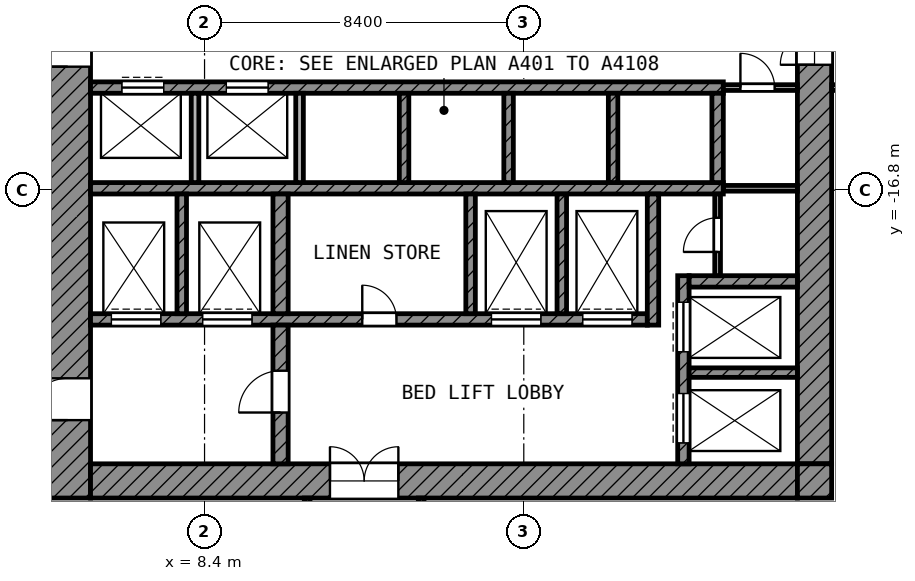
"""IFC4 building model, lengths in metres.
Left out: names, types, materials, properties, quantities, classifications, styles, units other than length and angle.
Written with IfcOpenShell. Run it as: python <this file> out.ifc"""

import sys

from ifc_helpers import new_model, si_unit, direction, frame, frame_2d, origin, place, context, subcontext, project, spatial, rectangle, extrude, element, fill, save


model = new_model("IFC4")
c1 = context("Model", 3, precision=1e-05, world=origin(), true_north=direction((0.0, 1.0)))
c2 = subcontext(c1, "Body", "Model", "MODEL_VIEW")
j1 = project(units=[si_unit("LENGTHUNIT", "METRE"), si_unit("PLANEANGLEUNIT", "RADIAN")], contexts=[c1])
p1 = place(None, origin())
s1 = spatial("IfcSite", under=j1, at=p1, CompositionType="ELEMENT")
p2 = place(p1, origin())
s2 = spatial("IfcBuilding", under=s1, at=p2, CompositionType="ELEMENT")
p3 = place(p2, frame((0.0, 0.0, 162.6)))
s3 = spatial("IfcBuildingStorey", under=s2, at=p3, CompositionType="ELEMENT", Elevation=162.6)
p4 = place(p3, frame((4.8, -24.9, 0.0), z_axis=(0.0, 0.0, 1.0), x_axis=(0.0, 1.0, 0.0)))
e1 = element("IfcWall", 1, at=p4, inside=s3, PredefinedType="SHEAR", context=c2, shape_type="SweptSolid", body=[
    extrude(rectangle(XDim=19.5, YDim=1.2, at=frame_2d((9.75, 0.0))), origin(), (0.0, 0.0, 1.0), 3.6),
])
p5 = place(p4, frame((11.35, 0.0, 0.0)))
e2 = element("IfcOpeningElement", 2, at=p5, cuts=e1, PredefinedType="OPENING", context=c2, shape_type="SweptSolid", body=[
    extrude(rectangle(XDim=1.1, YDim=2.1, at=frame_2d((0.55, 1.05))), frame((0.0, 0.61, 0.0), z_axis=(0.0, -1.0, 0.0), x_axis=(1.0, 0.0, 0.0)), (0.0, 0.0, 1.0), 1.22),
])
p6 = place(p4, frame((2.05, 0.0, 0.0)))
e3 = element("IfcOpeningElement", 3, at=p6, cuts=e1, PredefinedType="OPENING", context=c2, shape_type="SweptSolid", body=[
    extrude(rectangle(XDim=1.1, YDim=2.1, at=frame_2d((0.55, 1.05))), frame((0.0, 0.61, 0.0), z_axis=(0.0, -1.0, 0.0), x_axis=(1.0, 0.0, 0.0)), (0.0, 0.0, 1.0), 1.22),
])
p7 = place(p3, frame((24.45, -24.0, 0.0), z_axis=(0.0, 0.0, 1.0), x_axis=(0.0, 1.0, 0.0)))
e4 = element("IfcWall", 4, at=p7, inside=s3, PredefinedType="SHEAR", context=c2, shape_type="SweptSolid", body=[
    extrude(rectangle(XDim=18.6, YDim=0.9, at=frame_2d((9.3, 0.0))), origin(), (0.0, 0.0, 1.0), 3.6),
])
p8 = place(p7, frame((10.5, 0.0, 0.0)))
e5 = element("IfcOpeningElement", 5, at=p8, cuts=e4, PredefinedType="OPENING", context=c2, shape_type="SweptSolid", body=[
    extrude(rectangle(XDim=1.8, YDim=2.1, at=frame_2d((0.9, 1.05))), frame((0.0, 0.46, 0.0), z_axis=(0.0, -1.0, 0.0), x_axis=(1.0, 0.0, 0.0)), (0.0, 0.0, 1.0), 0.92),
])
p9 = place(p3, frame((5.4, -24.45, 0.0), z_axis=(0.0, 0.0, 1.0), x_axis=(1.0, 0.0, 0.0)))
e6 = element("IfcWall", 6, at=p9, inside=s3, PredefinedType="SHEAR", context=c2, shape_type="SweptSolid", body=[
    extrude(rectangle(XDim=18.6, YDim=0.9, at=frame_2d((9.3, 0.0))), origin(), (0.0, 0.0, 1.0), 3.6),
])
p10 = place(p9, frame((6.3, 0.0, 0.0)))
e7 = element("IfcOpeningElement", 7, at=p10, cuts=e6, PredefinedType="OPENING", context=c2, shape_type="SweptSolid", body=[
    extrude(rectangle(XDim=1.8, YDim=2.1, at=frame_2d((0.9, 1.05))), frame((0.0, 0.46, 0.0), z_axis=(0.0, -1.0, 0.0), x_axis=(1.0, 0.0, 0.0)), (0.0, 0.0, 1.0), 0.92),
])
p11 = place(p3, frame((24.45, -24.9, 0.0), z_axis=(0.0, 0.0, 1.0), x_axis=(0.0, 1.0, 0.0)))
e8 = element("IfcWall", 8, at=p11, inside=s3, PredefinedType="SHEAR", context=c2, shape_type="SweptSolid", body=[
    extrude(rectangle(XDim=0.9, YDim=0.9, at=frame_2d((0.45, 0.0))), origin(), (0.0, 0.0, 1.0), 3.6),
])
p12 = place(p3, frame((5.4, -14.1, 0.0), z_axis=(0.0, 0.0, 1.0), x_axis=(1.0, 0.0, 0.0)))
e9 = element("IfcWall", 9, at=p12, inside=s3, PredefinedType="SHEAR", context=c2, shape_type="SweptSolid", body=[
    extrude(rectangle(XDim=16.65, YDim=0.3, at=frame_2d((8.325, 0.0))), origin(), (0.0, 0.0, 1.0), 3.6),
])
p13 = place(p12, frame((0.825, 0.0, 0.0)))
e10 = element("IfcOpeningElement", 10, at=p13, cuts=e9, PredefinedType="OPENING", context=c2, shape_type="SweptSolid", body=[
    extrude(rectangle(XDim=1.1, YDim=2.1, at=frame_2d((0.55, 1.05))), frame((0.0, 0.16, 0.0), z_axis=(0.0, -1.0, 0.0), x_axis=(1.0, 0.0, 0.0)), (0.0, 0.0, 1.0), 0.32),
])
p14 = place(p12, frame((3.575, 0.0, 0.0)))
e11 = element("IfcOpeningElement", 11, at=p14, cuts=e9, PredefinedType="OPENING", context=c2, shape_type="SweptSolid", body=[
    extrude(rectangle(XDim=1.1, YDim=2.1, at=frame_2d((0.55, 1.05))), frame((0.0, 0.16, 0.0), z_axis=(0.0, -1.0, 0.0), x_axis=(1.0, 0.0, 0.0)), (0.0, 0.0, 1.0), 0.32),
])
p15 = place(p3, frame((5.4, -16.75, 0.0), z_axis=(0.0, 0.0, 1.0), x_axis=(1.0, 0.0, 0.0)))
e12 = element("IfcWall", 12, at=p15, inside=s3, PredefinedType="SHEAR", context=c2, shape_type="SweptSolid", body=[
    extrude(rectangle(XDim=16.65, YDim=0.3, at=frame_2d((8.325, 0.0))), origin(), (0.0, 0.0, 1.0), 3.6),
])
p16 = place(p3, frame((5.4, -20.2, 0.0), z_axis=(0.0, 0.0, 1.0), x_axis=(1.0, 0.0, 0.0)))
e13 = element("IfcWall", 13, at=p16, inside=s3, PredefinedType="SHEAR", context=c2, shape_type="SweptSolid", body=[
    extrude(rectangle(XDim=14.65, YDim=0.3, at=frame_2d((7.325, 0.0))), origin(), (0.0, 0.0, 1.0), 3.6),
])
p17 = place(p16, frame((10.55, 0.0, 0.0)))
e14 = element("IfcOpeningElement", 14, at=p17, cuts=e13, PredefinedType="OPENING", context=c2, shape_type="SweptSolid", body=[
    extrude(rectangle(XDim=1.3, YDim=2.1, at=frame_2d((0.65, 1.05))), frame((0.0, 0.16, 0.0), z_axis=(0.0, -1.0, 0.0), x_axis=(1.0, 0.0, 0.0)), (0.0, 0.0, 1.0), 0.32),
])
p18 = place(p16, frame((12.95, 0.0, 0.0)))
e15 = element("IfcOpeningElement", 15, at=p18, cuts=e13, PredefinedType="OPENING", context=c2, shape_type="SweptSolid", body=[
    extrude(rectangle(XDim=1.3, YDim=2.1, at=frame_2d((0.65, 1.05))), frame((0.0, 0.16, 0.0), z_axis=(0.0, -1.0, 0.0), x_axis=(1.0, 0.0, 0.0)), (0.0, 0.0, 1.0), 0.32),
])
p19 = place(p16, frame((0.55, 0.0, 0.0)))
e16 = element("IfcOpeningElement", 16, at=p19, cuts=e13, PredefinedType="OPENING", context=c2, shape_type="SweptSolid", body=[
    extrude(rectangle(XDim=1.3, YDim=2.1, at=frame_2d((0.65, 1.05))), frame((0.0, 0.16, 0.0), z_axis=(0.0, -1.0, 0.0), x_axis=(1.0, 0.0, 0.0)), (0.0, 0.0, 1.0), 0.32),
])
p20 = place(p16, frame((2.95, 0.0, 0.0)))
e17 = element("IfcOpeningElement", 17, at=p20, cuts=e13, PredefinedType="OPENING", context=c2, shape_type="SweptSolid", body=[
    extrude(rectangle(XDim=1.3, YDim=2.1, at=frame_2d((0.65, 1.05))), frame((0.0, 0.16, 0.0), z_axis=(0.0, -1.0, 0.0), x_axis=(1.0, 0.0, 0.0)), (0.0, 0.0, 1.0), 0.32),
])
p21 = place(p16, frame((7.15, 0.0, 0.0)))
e18 = element("IfcOpeningElement", 18, at=p21, cuts=e13, PredefinedType="OPENING", context=c2, shape_type="SweptSolid", body=[
    extrude(rectangle(XDim=0.9, YDim=2.1, at=frame_2d((0.45, 1.05))), frame((0.0, 0.16, 0.0), z_axis=(0.0, -1.0, 0.0), x_axis=(1.0, 0.0, 0.0)), (0.0, 0.0, 1.0), 0.32),
])
p22 = place(p3, frame((10.4, -24.0, 0.0), z_axis=(0.0, 0.0, 1.0), x_axis=(0.0, 1.0, 0.0)))
e19 = element("IfcWall", 19, at=p22, inside=s3, PredefinedType="SHEAR", context=c2, shape_type="SweptSolid", body=[
    extrude(rectangle(XDim=3.65, YDim=0.4, at=frame_2d((1.825, 0.0))), origin(), (0.0, 0.0, 1.0), 3.6),
])
p23 = place(p22, frame((1.35, 0.0, 0.0)))
e20 = element("IfcOpeningElement", 20, at=p23, cuts=e19, PredefinedType="OPENING", context=c2, shape_type="SweptSolid", body=[
    extrude(rectangle(XDim=1.1, YDim=2.1, at=frame_2d((0.55, 1.05))), frame((0.0, 0.21, 0.0), z_axis=(0.0, -1.0, 0.0), x_axis=(1.0, 0.0, 0.0)), (0.0, 0.0, 1.0), 0.42),
])
p24 = place(p3, frame((10.4, -20.05, 0.0), z_axis=(0.0, 0.0, 1.0), x_axis=(0.0, 1.0, 0.0)))
e21 = element("IfcWall", 21, at=p24, inside=s3, PredefinedType="SHEAR", context=c2, shape_type="SweptSolid", body=[
    extrude(rectangle(XDim=3.15, YDim=0.4, at=frame_2d((1.575, 0.0))), origin(), (0.0, 0.0, 1.0), 3.6),
])
p25 = place(p3, frame((20.2, -20.35, 0.0), z_axis=(0.0, 0.0, 1.0), x_axis=(0.0, 1.0, 0.0)))
e22 = element("IfcWall", 22, at=p25, inside=s3, PredefinedType="SHEAR", context=c2, shape_type="SweptSolid", body=[
    extrude(rectangle(XDim=3.45, YDim=0.3, at=frame_2d((1.725, 0.0))), origin(), (0.0, 0.0, 1.0), 3.6),
])
p26 = place(p3, frame((21.9, -16.6, 0.0), z_axis=(0.0, 0.0, 1.0), x_axis=(0.0, 1.0, 0.0)))
e23 = element("IfcWall", 23, at=p26, inside=s3, PredefinedType="SHEAR", context=c2, shape_type="SweptSolid", body=[
    extrude(rectangle(XDim=2.35, YDim=0.3, at=frame_2d((1.175, 0.0))), origin(), (0.0, 0.0, 1.0), 3.6),
])
p27 = place(p3, frame((21.15, -19.2, 0.0), z_axis=(0.0, 0.0, 1.0), x_axis=(1.0, 0.0, 0.0)))
e24 = element("IfcWall", 24, at=p27, inside=s3, PredefinedType="SHEAR", context=c2, shape_type="SweptSolid", body=[
    extrude(rectangle(XDim=2.85, YDim=0.3, at=frame_2d((1.425, 0.0))), origin(), (0.0, 0.0, 1.0), 3.6),
])
p28 = place(p3, frame((21.0, -24.0, 0.0), z_axis=(0.0, 0.0, 1.0), x_axis=(0.0, 1.0, 0.0)))
e25 = element("IfcWall", 25, at=p28, inside=s3, PredefinedType="SHEAR", context=c2, shape_type="SweptSolid", body=[
    extrude(rectangle(XDim=4.95, YDim=0.3, at=frame_2d((2.475, 0.0))), origin(), (0.0, 0.0, 1.0), 3.6),
])
p29 = place(p28, frame((2.95, 0.0, 0.0)))
e26 = element("IfcOpeningElement", 26, at=p29, cuts=e25, PredefinedType="OPENING", context=c2, shape_type="SweptSolid", body=[
    extrude(rectangle(XDim=1.3, YDim=2.1, at=frame_2d((0.65, 1.05))), frame((0.0, 0.16, 0.0), z_axis=(0.0, -1.0, 0.0), x_axis=(1.0, 0.0, 0.0)), (0.0, 0.0, 1.0), 0.32),
])
p30 = place(p28, frame((0.55, 0.0, 0.0)))
e27 = element("IfcOpeningElement", 27, at=p30, cuts=e25, PredefinedType="OPENING", context=c2, shape_type="SweptSolid", body=[
    extrude(rectangle(XDim=1.3, YDim=2.1, at=frame_2d((0.65, 1.05))), frame((0.0, 0.16, 0.0), z_axis=(0.0, -1.0, 0.0), x_axis=(1.0, 0.0, 0.0)), (0.0, 0.0, 1.0), 0.32),
])
p31 = place(p3, frame((21.15, -21.6, 0.0), z_axis=(0.0, 0.0, 1.0), x_axis=(1.0, 0.0, 0.0)))
e28 = element("IfcWall", 28, at=p31, inside=s3, PredefinedType="SHEAR", context=c2, shape_type="SweptSolid", body=[
    extrude(rectangle(XDim=2.85, YDim=0.25, at=frame_2d((1.425, 0.0))), origin(), (0.0, 0.0, 1.0), 3.6),
])
for number, where, z_axis, x_axis in (
    (29, (7.8, -20.05, 0.0), (0.0, 0.0, 1.0), (0.0, 1.0, 0.0)),
    (30, (15.4, -20.05, 0.0), (0.0, 0.0, 1.0), (0.0, 1.0, 0.0)),
    (31, (17.8, -20.05, 0.0), (0.0, 0.0, 1.0), (0.0, 1.0, 0.0)),
):
    element("IfcWall", number, at=place(p3, frame(where, z_axis=z_axis, x_axis=x_axis)), inside=s3, PredefinedType="SHEAR", context=c2, shape_type="SweptSolid", body=[
        extrude(rectangle(XDim=3.15, YDim=0.25, at=frame_2d((1.575, 0.0))), origin(), (0.0, 0.0, 1.0), 3.6),
    ])
for number, where, z_axis, x_axis in (
    (32, (8.15, -16.6, 0.0), (0.0, 0.0, 1.0), (0.0, 1.0, 0.0)),
    (33, (10.9, -16.6, 0.0), (0.0, 0.0, 1.0), (0.0, 1.0, 0.0)),
):
    element("IfcWall", number, at=place(p3, frame(where, z_axis=z_axis, x_axis=x_axis)), inside=s3, PredefinedType="PARTITIONING", context=c2, shape_type="SweptSolid", body=[
        extrude(rectangle(XDim=2.35, YDim=0.2, at=frame_2d((1.175, 0.0))), origin(), (0.0, 0.0, 1.0), 3.6),
    ])
for number, where, z_axis, x_axis in (
    (34, (13.65, -16.6, 0.0), (0.0, 0.0, 1.0), (0.0, 1.0, 0.0)),
    (35, (16.4, -16.6, 0.0), (0.0, 0.0, 1.0), (0.0, 1.0, 0.0)),
    (36, (19.15, -16.6, 0.0), (0.0, 0.0, 1.0), (0.0, 1.0, 0.0)),
):
    element("IfcWall", number, at=place(p3, frame(where, z_axis=z_axis, x_axis=x_axis)), inside=s3, PredefinedType="SHEAR", context=c2, shape_type="SweptSolid", body=[
        extrude(rectangle(XDim=2.35, YDim=0.25, at=frame_2d((1.175, 0.0))), origin(), (0.0, 0.0, 1.0), 3.6),
    ])
p32 = place(p3, frame((21.9, -19.05, 0.0), z_axis=(0.0, 0.0, 1.0), x_axis=(0.0, 1.0, 0.0)))
e37 = element("IfcWall", 37, at=p32, inside=s3, PredefinedType="PARTITIONING", context=c2, shape_type="SweptSolid", body=[
    extrude(rectangle(XDim=2.15, YDim=0.15, at=frame_2d((1.075, 0.0))), origin(), (0.0, 0.0, 1.0), 3.6),
])
p33 = place(p32, frame((0.625, 0.0, 0.0)))
e38 = element("IfcOpeningElement", 38, at=p33, cuts=e37, PredefinedType="OPENING", context=c2, shape_type="SweptSolid", body=[
    extrude(rectangle(XDim=0.9, YDim=2.1, at=frame_2d((0.45, 1.05))), frame((0.0, 0.085, 0.0), z_axis=(0.0, -1.0, 0.0), x_axis=(1.0, 0.0, 0.0)), (0.0, 0.0, 1.0), 0.17),
])
p34 = place(p3, frame((22.05, -16.75, 0.0), z_axis=(0.0, 0.0, 1.0), x_axis=(1.0, 0.0, 0.0)))
e39 = element("IfcWall", 39, at=p34, inside=s3, PredefinedType="PARTITIONING", context=c2, shape_type="SweptSolid", body=[
    extrude(rectangle(XDim=1.95, YDim=0.15, at=frame_2d((0.975, 0.0))), origin(), (0.0, 0.0, 1.0), 3.6),
])
p35 = place(p3, frame((22.05, -14.1, 0.0), z_axis=(0.0, 0.0, 1.0), x_axis=(1.0, 0.0, 0.0)))
e40 = element("IfcWall", 40, at=p35, inside=s3, PredefinedType="PARTITIONING", context=c2, shape_type="SweptSolid", body=[
    extrude(rectangle(XDim=1.95, YDim=0.15, at=frame_2d((0.975, 0.0))), origin(), (0.0, 0.0, 1.0), 3.6),
])
p36 = place(p35, frame((0.45, 0.0, 0.0)))
e41 = element("IfcOpeningElement", 41, at=p36, cuts=e40, PredefinedType="OPENING", context=c2, shape_type="SweptSolid", body=[
    extrude(rectangle(XDim=0.9, YDim=2.1, at=frame_2d((0.45, 1.05))), frame((0.0, 0.085, 0.0), z_axis=(0.0, -1.0, 0.0), x_axis=(1.0, 0.0, 0.0)), (0.0, 0.0, 1.0), 0.17),
])
p37 = place(p3, frame((24.9, -14.1, 0.0), z_axis=(0.0, 0.0, 1.0), x_axis=(1.0, 0.0, 0.0)))
e42 = element("IfcWall", 42, at=p37, inside=s3, PredefinedType="PARTITIONING", context=c2, shape_type="SweptSolid", body=[
    extrude(rectangle(XDim=4.425, YDim=0.15, at=frame_2d((2.212, 0.0))), origin(), (0.0, 0.0, 1.0), 3.6),
])
p38 = place(p37, frame((1.9, 0.0, 0.0)))
e43 = element("IfcOpeningElement", 43, at=p38, cuts=e42, PredefinedType="OPENING", context=c2, shape_type="SweptSolid", body=[
    extrude(rectangle(XDim=1.0, YDim=2.1, at=frame_2d((0.5, 1.05))), frame((0.0, 0.085, 0.0), z_axis=(0.0, -1.0, 0.0), x_axis=(1.0, 0.0, 0.0)), (0.0, 0.0, 1.0), 0.17),
])
p39 = place(p3, frame((11.1, -29.398, 0.0), z_axis=(0.0, 0.0, 1.0), x_axis=(0.0, 1.0, 0.0)))
e44 = element("IfcWall", 44, at=p39, inside=s3, PredefinedType="PARTITIONING", context=c2, shape_type="SweptSolid", body=[
    extrude(rectangle(XDim=4.498, YDim=0.15, at=frame_2d((2.249, 0.0))), origin(), (0.0, 0.0, 1.0), 3.6),
])
p40 = place(p39, frame((1.499, 0.0, 0.0)))
e45 = element("IfcOpeningElement", 45, at=p40, cuts=e44, PredefinedType="OPENING", context=c2, shape_type="SweptSolid", body=[
    extrude(rectangle(XDim=1.2, YDim=2.1, at=frame_2d((0.6, 1.05))), frame((0.0, 0.085, 0.0), z_axis=(0.0, -1.0, 0.0), x_axis=(1.0, 0.0, 0.0)), (0.0, 0.0, 1.0), 0.17),
])
p41 = place(p3, frame((14.1, -29.4, 0.0), z_axis=(0.0, 0.0, 1.0), x_axis=(0.0, 1.0, 0.0)))
e46 = element("IfcWall", 46, at=p41, inside=s3, PredefinedType="PARTITIONING", context=c2, shape_type="SweptSolid", body=[
    extrude(rectangle(XDim=4.5, YDim=0.15, at=frame_2d((2.25, 0.0))), origin(), (0.0, 0.0, 1.0), 3.6),
])
p42 = place(p13, origin())
e47 = element("IfcDoor", 47, at=p42, inside=s3, OperationType="DOUBLE_DOOR_SLIDING", PredefinedType="DOOR", context=c2, shape_type="SweptSolid", body=[
    extrude(rectangle(XDim=1.1, YDim=2.1, at=frame_2d((0.55, 1.05))), frame((0.0, 0.025, 0.0), z_axis=(0.0, -1.0, 0.0), x_axis=(1.0, 0.0, 0.0)), (0.0, 0.0, 1.0), 0.05),
])
fill(e10, e47)
p43 = place(p14, origin())
e48 = element("IfcDoor", 48, at=p43, inside=s3, OperationType="DOUBLE_DOOR_SLIDING", PredefinedType="DOOR", context=c2, shape_type="SweptSolid", body=[
    extrude(rectangle(XDim=1.1, YDim=2.1, at=frame_2d((0.55, 1.05))), frame((0.0, 0.025, 0.0), z_axis=(0.0, -1.0, 0.0), x_axis=(1.0, 0.0, 0.0)), (0.0, 0.0, 1.0), 0.05),
])
fill(e11, e48)
p44 = place(p29, origin())
e49 = element("IfcDoor", 49, at=p44, inside=s3, OperationType="DOUBLE_DOOR_SLIDING", PredefinedType="DOOR", context=c2, shape_type="SweptSolid", body=[
    extrude(rectangle(XDim=1.3, YDim=2.1, at=frame_2d((0.65, 1.05))), frame((0.0, 0.025, 0.0), z_axis=(0.0, -1.0, 0.0), x_axis=(1.0, 0.0, 0.0)), (0.0, 0.0, 1.0), 0.05),
])
fill(e26, e49)
p45 = place(p30, origin())
e50 = element("IfcDoor", 50, at=p45, inside=s3, OperationType="DOUBLE_DOOR_SLIDING", PredefinedType="DOOR", context=c2, shape_type="SweptSolid", body=[
    extrude(rectangle(XDim=1.3, YDim=2.1, at=frame_2d((0.65, 1.05))), frame((0.0, 0.025, 0.0), z_axis=(0.0, -1.0, 0.0), x_axis=(1.0, 0.0, 0.0)), (0.0, 0.0, 1.0), 0.05),
])
fill(e27, e50)
p46 = place(p17, origin())
e51 = element("IfcDoor", 51, at=p46, inside=s3, OperationType="DOUBLE_DOOR_SLIDING", PredefinedType="DOOR", context=c2, shape_type="SweptSolid", body=[
    extrude(rectangle(XDim=1.3, YDim=2.1, at=frame_2d((0.65, 1.05))), frame((0.0, 0.025, 0.0), z_axis=(0.0, -1.0, 0.0), x_axis=(1.0, 0.0, 0.0)), (0.0, 0.0, 1.0), 0.05),
])
fill(e14, e51)
p47 = place(p18, origin())
e52 = element("IfcDoor", 52, at=p47, inside=s3, OperationType="DOUBLE_DOOR_SLIDING", PredefinedType="DOOR", context=c2, shape_type="SweptSolid", body=[
    extrude(rectangle(XDim=1.3, YDim=2.1, at=frame_2d((0.65, 1.05))), frame((0.0, 0.025, 0.0), z_axis=(0.0, -1.0, 0.0), x_axis=(1.0, 0.0, 0.0)), (0.0, 0.0, 1.0), 0.05),
])
fill(e15, e52)
p48 = place(p19, origin())
e53 = element("IfcDoor", 53, at=p48, inside=s3, OperationType="DOUBLE_DOOR_SLIDING", PredefinedType="DOOR", context=c2, shape_type="SweptSolid", body=[
    extrude(rectangle(XDim=1.3, YDim=2.1, at=frame_2d((0.65, 1.05))), frame((0.0, 0.025, 0.0), z_axis=(0.0, -1.0, 0.0), x_axis=(1.0, 0.0, 0.0)), (0.0, 0.0, 1.0), 0.05),
])
fill(e16, e53)
p49 = place(p20, origin())
e54 = element("IfcDoor", 54, at=p49, inside=s3, OperationType="DOUBLE_DOOR_SLIDING", PredefinedType="DOOR", context=c2, shape_type="SweptSolid", body=[
    extrude(rectangle(XDim=1.3, YDim=2.1, at=frame_2d((0.65, 1.05))), frame((0.0, 0.025, 0.0), z_axis=(0.0, -1.0, 0.0), x_axis=(1.0, 0.0, 0.0)), (0.0, 0.0, 1.0), 0.05),
])
fill(e17, e54)
p50 = place(p5, origin())
e55 = element("IfcDoor", 55, at=p50, inside=s3, OperationType="SINGLE_SWING_LEFT", PredefinedType="DOOR", context=c2, shape_type="SweptSolid", body=[
    extrude(rectangle(XDim=1.1, YDim=2.1, at=frame_2d((0.55, 1.05))), frame((0.0, 0.025, 0.0), z_axis=(0.0, -1.0, 0.0), x_axis=(1.0, 0.0, 0.0)), (0.0, 0.0, 1.0), 0.05),
])
fill(e2, e55)
p51 = place(p6, origin())
e56 = element("IfcDoor", 56, at=p51, inside=s3, OperationType="SINGLE_SWING_LEFT", PredefinedType="DOOR", context=c2, shape_type="SweptSolid", body=[
    extrude(rectangle(XDim=1.1, YDim=2.1, at=frame_2d((0.55, 1.05))), frame((0.0, 0.025, 0.0), z_axis=(0.0, -1.0, 0.0), x_axis=(1.0, 0.0, 0.0)), (0.0, 0.0, 1.0), 0.05),
])
fill(e3, e56)
p52 = place(p23, origin())
e57 = element("IfcDoor", 57, at=p52, inside=s3, OperationType="SINGLE_SWING_LEFT", PredefinedType="DOOR", context=c2, shape_type="SweptSolid", body=[
    extrude(rectangle(XDim=1.1, YDim=2.1, at=frame_2d((0.55, 1.05))), frame((0.0, 0.025, 0.0), z_axis=(0.0, -1.0, 0.0), x_axis=(1.0, 0.0, 0.0)), (0.0, 0.0, 1.0), 0.05),
])
fill(e20, e57)
p53 = place(p8, origin())
e58 = element("IfcDoor", 58, at=p53, inside=s3, OperationType="DOUBLE_DOOR_SINGLE_SWING", PredefinedType="DOOR", context=c2, shape_type="SweptSolid", body=[
    extrude(rectangle(XDim=1.8, YDim=2.1, at=frame_2d((0.9, 1.05))), frame((0.0, 0.025, 0.0), z_axis=(0.0, -1.0, 0.0), x_axis=(1.0, 0.0, 0.0)), (0.0, 0.0, 1.0), 0.05),
])
fill(e5, e58)
p54 = place(p10, origin())
e59 = element("IfcDoor", 59, at=p54, inside=s3, OperationType="DOUBLE_DOOR_SINGLE_SWING", PredefinedType="DOOR", context=c2, shape_type="SweptSolid", body=[
    extrude(rectangle(XDim=1.8, YDim=2.1, at=frame_2d((0.9, 1.05))), frame((0.0, 0.025, 0.0), z_axis=(0.0, -1.0, 0.0), x_axis=(1.0, 0.0, 0.0)), (0.0, 0.0, 1.0), 0.05),
])
fill(e7, e59)
p55 = place(p36, origin())
e60 = element("IfcDoor", 60, at=p55, inside=s3, OperationType="SINGLE_SWING_LEFT", PredefinedType="DOOR", context=c2, shape_type="SweptSolid", body=[
    extrude(rectangle(XDim=0.9, YDim=2.1, at=frame_2d((0.45, 1.05))), frame((0.0, 0.025, 0.0), z_axis=(0.0, -1.0, 0.0), x_axis=(1.0, 0.0, 0.0)), (0.0, 0.0, 1.0), 0.05),
])
fill(e41, e60)
p56 = place(p33, origin())
e61 = element("IfcDoor", 61, at=p56, inside=s3, OperationType="SINGLE_SWING_LEFT", PredefinedType="DOOR", context=c2, shape_type="SweptSolid", body=[
    extrude(rectangle(XDim=0.9, YDim=2.1, at=frame_2d((0.45, 1.05))), frame((0.0, 0.025, 0.0), z_axis=(0.0, -1.0, 0.0), x_axis=(1.0, 0.0, 0.0)), (0.0, 0.0, 1.0), 0.05),
])
fill(e38, e61)
p57 = place(p21, origin())
e62 = element("IfcDoor", 62, at=p57, inside=s3, OperationType="SINGLE_SWING_LEFT", PredefinedType="DOOR", context=c2, shape_type="SweptSolid", body=[
    extrude(rectangle(XDim=0.9, YDim=2.1, at=frame_2d((0.45, 1.05))), frame((0.0, 0.025, 0.0), z_axis=(0.0, -1.0, 0.0), x_axis=(1.0, 0.0, 0.0)), (0.0, 0.0, 1.0), 0.05),
])
fill(e18, e62)
save(model, sys.argv[1])
